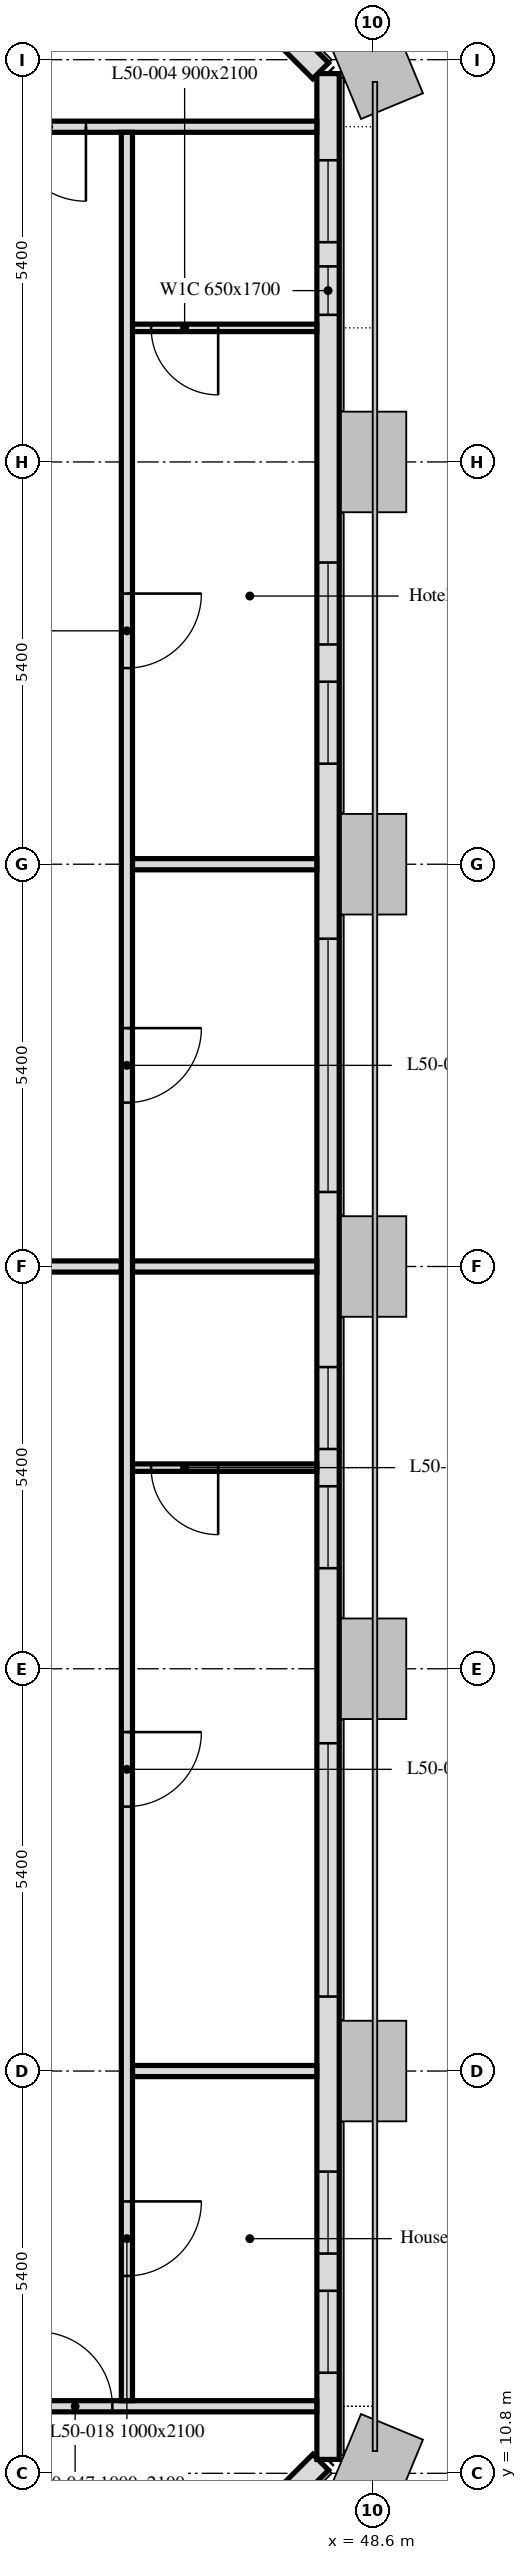
"""IFC4 building model, lengths in metres.
Left out: names, types, materials, properties, quantities, classifications, styles, units other than length and angle.
Written with IfcOpenShell. Run it as: python <this file> out.ifc"""

import sys

from ifc_helpers import new_model, si_unit, direction, frame, frame_2d, origin, place, context, subcontext, project, spatial, rectangle, extrude, element, fill, save


model = new_model("IFC4")
c1 = context("Model", 3, precision=1e-05, world=origin(), true_north=direction((0.0, 1.0)))
c2 = subcontext(c1, "Body", "Model", "MODEL_VIEW")
j1 = project(units=[si_unit("LENGTHUNIT", "METRE"), si_unit("PLANEANGLEUNIT", "RADIAN")], contexts=[c1])
p1 = place(None, origin())
s1 = spatial("IfcSite", under=j1, at=p1, CompositionType="ELEMENT")
p2 = place(p1, origin())
s2 = spatial("IfcBuilding", under=s1, at=p2, CompositionType="ELEMENT")
p3 = place(p2, frame((0.0, 0.0, 203.8)))
s3 = spatial("IfcBuildingStorey", under=s2, at=p3, CompositionType="ELEMENT", Elevation=203.8)
p4 = place(p3, frame((43.051, 6.099, 0.0), z_axis=(0.0, 0.0, 1.0), x_axis=(0.707106781187, 0.707106781187, 0.0)))
e1 = element("IfcWall", 1, at=p4, inside=s3, PredefinedType="SOLIDWALL", context=c2, shape_type="SweptSolid", body=[
    extrude(rectangle(XDim=6.86, YDim=0.3, at=frame_2d((3.43, 0.0))), origin(), (0.0, 0.0, 1.0), 3.0),
])
p5 = place(p4, frame((1.28, 0.0, 0.9)))
e2 = element("IfcOpeningElement", 2, at=p5, cuts=e1, PredefinedType="OPENING", context=c2, shape_type="SweptSolid", body=[
    extrude(rectangle(XDim=1.1, YDim=1.7, at=frame_2d((0.55, 0.85))), frame((0.0, 0.16, 0.0), z_axis=(0.0, -1.0, 0.0), x_axis=(1.0, 0.0, 0.0)), (0.0, 0.0, 1.0), 0.32),
])
p6 = place(p4, frame((4.48, 0.0, 0.9)))
e3 = element("IfcOpeningElement", 3, at=p6, cuts=e1, PredefinedType="OPENING", context=c2, shape_type="SweptSolid", body=[
    extrude(rectangle(XDim=1.1, YDim=1.7, at=frame_2d((0.55, 0.85))), frame((0.0, 0.16, 0.0), z_axis=(0.0, -1.0, 0.0), x_axis=(1.0, 0.0, 0.0)), (0.0, 0.0, 1.0), 0.32),
])
p7 = place(p3, frame((48.0, 10.986, 0.0), z_axis=(0.0, 0.0, 1.0), x_axis=(0.0, 1.0, 0.0)))
e4 = element("IfcWall", 4, at=p7, inside=s3, PredefinedType="SOLIDWALL", context=c2, shape_type="SweptSolid", body=[
    extrude(rectangle(XDim=32.027, YDim=0.3, at=frame_2d((16.014, 0.0))), origin(), (0.0, 0.0, 1.0), 3.0),
])
p8 = place(p7, frame((1.164, 0.0, 0.9)))
e5 = element("IfcOpeningElement", 5, at=p8, cuts=e4, PredefinedType="OPENING", context=c2, shape_type="SweptSolid", body=[
    extrude(rectangle(XDim=1.1, YDim=1.7, at=frame_2d((0.55, 0.85))), frame((0.0, 0.16, 0.0), z_axis=(0.0, -1.0, 0.0), x_axis=(1.0, 0.0, 0.0)), (0.0, 0.0, 1.0), 0.32),
])
p9 = place(p7, frame((2.764, 0.0, 0.9)))
e6 = element("IfcOpeningElement", 6, at=p9, cuts=e4, PredefinedType="OPENING", context=c2, shape_type="SweptSolid", body=[
    extrude(rectangle(XDim=1.1, YDim=1.7, at=frame_2d((0.55, 0.85))), frame((0.0, 0.16, 0.0), z_axis=(0.0, -1.0, 0.0), x_axis=(1.0, 0.0, 0.0)), (0.0, 0.0, 1.0), 0.32),
])
p10 = place(p7, frame((6.214, 0.0, 0.9)))
e7 = element("IfcOpeningElement", 7, at=p10, cuts=e4, PredefinedType="OPENING", context=c2, shape_type="SweptSolid", body=[
    extrude(rectangle(XDim=3.4, YDim=1.7, at=frame_2d((1.7, 0.85))), frame((0.0, 0.16, 0.0), z_axis=(0.0, -1.0, 0.0), x_axis=(1.0, 0.0, 0.0)), (0.0, 0.0, 1.0), 0.32),
])
p11 = place(p7, frame((11.964, 0.0, 0.9)))
e8 = element("IfcOpeningElement", 8, at=p11, cuts=e4, PredefinedType="OPENING", context=c2, shape_type="SweptSolid", body=[
    extrude(rectangle(XDim=1.1, YDim=1.7, at=frame_2d((0.55, 0.85))), frame((0.0, 0.16, 0.0), z_axis=(0.0, -1.0, 0.0), x_axis=(1.0, 0.0, 0.0)), (0.0, 0.0, 1.0), 0.32),
])
p12 = place(p7, frame((13.564, 0.0, 0.9)))
e9 = element("IfcOpeningElement", 9, at=p12, cuts=e4, PredefinedType="OPENING", context=c2, shape_type="SweptSolid", body=[
    extrude(rectangle(XDim=1.1, YDim=1.7, at=frame_2d((0.55, 0.85))), frame((0.0, 0.16, 0.0), z_axis=(0.0, -1.0, 0.0), x_axis=(1.0, 0.0, 0.0)), (0.0, 0.0, 1.0), 0.32),
])
p13 = place(p7, frame((17.014, 0.0, 0.9)))
e10 = element("IfcOpeningElement", 10, at=p13, cuts=e4, PredefinedType="OPENING", context=c2, shape_type="SweptSolid", body=[
    extrude(rectangle(XDim=3.4, YDim=1.7, at=frame_2d((1.7, 0.85))), frame((0.0, 0.16, 0.0), z_axis=(0.0, -1.0, 0.0), x_axis=(1.0, 0.0, 0.0)), (0.0, 0.0, 1.0), 0.32),
])
p14 = place(p7, frame((22.764, 0.0, 0.9)))
e11 = element("IfcOpeningElement", 11, at=p14, cuts=e4, PredefinedType="OPENING", context=c2, shape_type="SweptSolid", body=[
    extrude(rectangle(XDim=1.1, YDim=1.7, at=frame_2d((0.55, 0.85))), frame((0.0, 0.16, 0.0), z_axis=(0.0, -1.0, 0.0), x_axis=(1.0, 0.0, 0.0)), (0.0, 0.0, 1.0), 0.32),
])
p15 = place(p7, frame((24.364, 0.0, 0.9)))
e12 = element("IfcOpeningElement", 12, at=p15, cuts=e4, PredefinedType="OPENING", context=c2, shape_type="SweptSolid", body=[
    extrude(rectangle(XDim=1.1, YDim=1.7, at=frame_2d((0.55, 0.85))), frame((0.0, 0.16, 0.0), z_axis=(0.0, -1.0, 0.0), x_axis=(1.0, 0.0, 0.0)), (0.0, 0.0, 1.0), 0.32),
])
p16 = place(p7, frame((28.789, 0.0, 0.9)))
e13 = element("IfcOpeningElement", 13, at=p16, cuts=e4, PredefinedType="OPENING", context=c2, shape_type="SweptSolid", body=[
    extrude(rectangle(XDim=0.65, YDim=1.7, at=frame_2d((0.325, 0.85))), frame((0.0, 0.16, 0.0), z_axis=(0.0, -1.0, 0.0), x_axis=(1.0, 0.0, 0.0)), (0.0, 0.0, 1.0), 0.32),
])
p17 = place(p7, frame((29.764, 0.0, 0.9)))
e14 = element("IfcOpeningElement", 14, at=p17, cuts=e4, PredefinedType="OPENING", context=c2, shape_type="SweptSolid", body=[
    extrude(rectangle(XDim=1.1, YDim=1.7, at=frame_2d((0.55, 0.85))), frame((0.0, 0.16, 0.0), z_axis=(0.0, -1.0, 0.0), x_axis=(1.0, 0.0, 0.0)), (0.0, 0.0, 1.0), 0.32),
])
p18 = place(p3, frame((47.901, 43.051, 0.0), z_axis=(0.0, 0.0, 1.0), x_axis=(-0.707106781187, 0.707106781187, 0.0)))
e15 = element("IfcWall", 15, at=p18, inside=s3, PredefinedType="SOLIDWALL", context=c2, shape_type="SweptSolid", body=[
    extrude(rectangle(XDim=6.86, YDim=0.3, at=frame_2d((3.43, 0.0))), origin(), (0.0, 0.0, 1.0), 3.0),
])
p19 = place(p18, frame((1.28, 0.0, 0.9)))
e16 = element("IfcOpeningElement", 16, at=p19, cuts=e15, PredefinedType="OPENING", context=c2, shape_type="SweptSolid", body=[
    extrude(rectangle(XDim=1.1, YDim=1.7, at=frame_2d((0.55, 0.85))), frame((0.0, 0.16, 0.0), z_axis=(0.0, -1.0, 0.0), x_axis=(1.0, 0.0, 0.0)), (0.0, 0.0, 1.0), 0.32),
])
p20 = place(p18, frame((4.48, 0.0, 0.9)))
e17 = element("IfcOpeningElement", 17, at=p20, cuts=e15, PredefinedType="OPENING", context=c2, shape_type="SweptSolid", body=[
    extrude(rectangle(XDim=1.1, YDim=1.7, at=frame_2d((0.55, 0.85))), frame((0.0, 0.16, 0.0), z_axis=(0.0, -1.0, 0.0), x_axis=(1.0, 0.0, 0.0)), (0.0, 0.0, 1.0), 0.32),
])
p21 = place(p3, frame((45.375, 32.4, 0.0), z_axis=(0.0, 0.0, 1.0), x_axis=(1.0, 0.0, 0.0)))
e18 = element("IfcWall", 18, at=p21, inside=s3, PredefinedType="PARTITIONING", context=c2, shape_type="SweptSolid", body=[
    extrude(rectangle(XDim=2.474, YDim=0.15, at=frame_2d((1.237, 0.0))), origin(), (0.0, 0.0, 1.0), 2.4),
])
p22 = place(p3, frame((47.849, 39.6, 0.0), z_axis=(0.0, 0.0, 1.0), x_axis=(-1.0, 0.0, 0.0)))
e19 = element("IfcWall", 19, at=p22, inside=s3, PredefinedType="PARTITIONING", context=c2, shape_type="SweptSolid", body=[
    extrude(rectangle(XDim=2.474, YDim=0.1, at=frame_2d((1.237, 0.0))), origin(), (0.0, 0.0, 1.0), 3.0),
])
p23 = place(p22, frame((1.324, 0.0, 0.0)))
e20 = element("IfcOpeningElement", 20, at=p23, cuts=e19, PredefinedType="OPENING", context=c2, shape_type="SweptSolid", body=[
    extrude(rectangle(XDim=0.9, YDim=2.1, at=frame_2d((0.45, 1.05))), frame((0.0, 0.05, 0.0), z_axis=(0.0, -1.0, 0.0), x_axis=(1.0, 0.0, 0.0)), (0.0, 0.0, 1.0), 0.1),
])
p24 = place(p3, frame((47.849, 42.3, 0.0), z_axis=(0.0, 0.0, 1.0), x_axis=(-1.0, 0.0, 0.0)))
e21 = element("IfcWall", 21, at=p24, inside=s3, PredefinedType="PARTITIONING", context=c2, shape_type="SweptSolid", body=[
    extrude(rectangle(XDim=41.698, YDim=0.15, at=frame_2d((20.849, 0.0))), origin(), (0.0, 0.0, 1.0), 2.4),
])
p25 = place(p24, frame((39.566, 0.0, 0.0)))
e22 = element("IfcOpeningElement", 22, at=p25, cuts=e21, PredefinedType="OPENING", context=c2, shape_type="SweptSolid", body=[
    extrude(rectangle(XDim=1.0, YDim=2.1, at=frame_2d((0.5, 1.05))), frame((0.0, 0.075, 0.0), z_axis=(0.0, -1.0, 0.0), x_axis=(1.0, 0.0, 0.0)), (0.0, 0.0, 1.0), 0.15),
])
p26 = place(p24, frame((3.099, 0.0, 0.0)))
e23 = element("IfcOpeningElement", 23, at=p26, cuts=e21, PredefinedType="OPENING", context=c2, shape_type="SweptSolid", body=[
    extrude(rectangle(XDim=1.0, YDim=2.1, at=frame_2d((0.5, 1.05))), frame((0.0, 0.075, 0.0), z_axis=(0.0, -1.0, 0.0), x_axis=(1.0, 0.0, 0.0)), (0.0, 0.0, 1.0), 0.15),
])
p27 = place(p24, frame((28.249, 0.0, 0.0)))
e24 = element("IfcOpeningElement", 24, at=p27, cuts=e21, PredefinedType="OPENING", context=c2, shape_type="SweptSolid", body=[
    extrude(rectangle(XDim=1.0, YDim=2.1, at=frame_2d((0.5, 1.05))), frame((0.0, 0.075, 0.0), z_axis=(0.0, -1.0, 0.0), x_axis=(1.0, 0.0, 0.0)), (0.0, 0.0, 1.0), 0.15),
])
p28 = place(p24, frame((17.449, 0.0, 0.0)))
e25 = element("IfcOpeningElement", 25, at=p28, cuts=e21, PredefinedType="OPENING", context=c2, shape_type="SweptSolid", body=[
    extrude(rectangle(XDim=1.0, YDim=2.1, at=frame_2d((0.5, 1.05))), frame((0.0, 0.075, 0.0), z_axis=(0.0, -1.0, 0.0), x_axis=(1.0, 0.0, 0.0)), (0.0, 0.0, 1.0), 0.15),
])
p29 = place(p3, frame((45.375, 27.0, 0.0), z_axis=(0.0, 0.0, 1.0), x_axis=(1.0, 0.0, 0.0)))
e26 = element("IfcWall", 26, at=p29, inside=s3, PredefinedType="PARTITIONING", context=c2, shape_type="SweptSolid", body=[
    extrude(rectangle(XDim=2.474, YDim=0.15, at=frame_2d((1.237, 0.0))), origin(), (0.0, 0.0, 1.0), 2.4),
])
p30 = place(p3, frame((43.2, 27.0, 0.0), z_axis=(0.0, 0.0, 1.0), x_axis=(1.0, 0.0, 0.0)))
e27 = element("IfcWall", 27, at=p30, inside=s3, PredefinedType="PARTITIONING", context=c2, shape_type="SweptSolid", body=[
    extrude(rectangle(XDim=2.025, YDim=0.15, at=frame_2d((1.013, 0.0))), origin(), (0.0, 0.0, 1.0), 2.4),
])
p31 = place(p3, frame((47.849, 16.2, 0.0), z_axis=(0.0, 0.0, 1.0), x_axis=(-1.0, 0.0, 0.0)))
e28 = element("IfcWall", 28, at=p31, inside=s3, PredefinedType="PARTITIONING", context=c2, shape_type="SweptSolid", body=[
    extrude(rectangle(XDim=2.474, YDim=0.15, at=frame_2d((1.237, 0.0))), origin(), (0.0, 0.0, 1.0), 2.4),
])
p32 = place(p3, frame((6.151, 11.7, 0.0), z_axis=(0.0, 0.0, 1.0), x_axis=(1.0, 0.0, 0.0)))
e29 = element("IfcWall", 29, at=p32, inside=s3, PredefinedType="PARTITIONING", context=c2, shape_type="SweptSolid", body=[
    extrude(rectangle(XDim=41.698, YDim=0.15, at=frame_2d((20.849, 0.0))), origin(), (0.0, 0.0, 1.0), 3.0),
])
p33 = place(p32, frame((37.954, 0.0, 0.0)))
e30 = element("IfcOpeningElement", 30, at=p33, cuts=e29, PredefinedType="OPENING", context=c2, shape_type="SweptSolid", body=[
    extrude(rectangle(XDim=1.0, YDim=2.1, at=frame_2d((0.5, 1.05))), frame((0.0, 0.075, 0.0), z_axis=(0.0, -1.0, 0.0), x_axis=(1.0, 0.0, 0.0)), (0.0, 0.0, 1.0), 0.15),
])
p34 = place(p32, frame((6.849, 0.0, 0.0)))
e31 = element("IfcOpeningElement", 31, at=p34, cuts=e29, PredefinedType="OPENING", context=c2, shape_type="SweptSolid", body=[
    extrude(rectangle(XDim=1.0, YDim=2.1, at=frame_2d((0.5, 1.05))), frame((0.0, 0.075, 0.0), z_axis=(0.0, -1.0, 0.0), x_axis=(1.0, 0.0, 0.0)), (0.0, 0.0, 1.0), 0.15),
])
p35 = place(p32, frame((23.049, 0.0, 0.0)))
e32 = element("IfcOpeningElement", 32, at=p35, cuts=e29, PredefinedType="OPENING", context=c2, shape_type="SweptSolid", body=[
    extrude(rectangle(XDim=1.0, YDim=2.1, at=frame_2d((0.5, 1.05))), frame((0.0, 0.075, 0.0), z_axis=(0.0, -1.0, 0.0), x_axis=(1.0, 0.0, 0.0)), (0.0, 0.0, 1.0), 0.15),
])
p36 = place(p3, frame((47.849, 24.3, 0.0), z_axis=(0.0, 0.0, 1.0), x_axis=(-1.0, 0.0, 0.0)))
e33 = element("IfcWall", 33, at=p36, inside=s3, PredefinedType="PARTITIONING", context=c2, shape_type="SweptSolid", body=[
    extrude(rectangle(XDim=2.474, YDim=0.1, at=frame_2d((1.237, 0.0))), origin(), (0.0, 0.0, 1.0), 3.0),
])
p37 = place(p36, frame((1.324, 0.0, 0.0)))
e34 = element("IfcOpeningElement", 34, at=p37, cuts=e33, PredefinedType="OPENING", context=c2, shape_type="SweptSolid", body=[
    extrude(rectangle(XDim=0.9, YDim=2.1, at=frame_2d((0.45, 1.05))), frame((0.0, 0.05, 0.0), z_axis=(0.0, -1.0, 0.0), x_axis=(1.0, 0.0, 0.0)), (0.0, 0.0, 1.0), 0.1),
])
p38 = place(p3, frame((45.3, 42.225, 0.0), z_axis=(0.0, 0.0, 1.0), x_axis=(0.0, -1.0, 0.0)))
e35 = element("IfcWall", 35, at=p38, inside=s3, PredefinedType="PARTITIONING", context=c2, shape_type="SweptSolid", body=[
    extrude(rectangle(XDim=30.45, YDim=0.15, at=frame_2d((15.225, 0.0))), origin(), (0.0, 0.0, 1.0), 2.4),
])
p39 = place(p38, frame((12.025, 0.0, 0.0)))
e36 = element("IfcOpeningElement", 36, at=p39, cuts=e35, PredefinedType="OPENING", context=c2, shape_type="SweptSolid", body=[
    extrude(rectangle(XDim=1.0, YDim=2.1, at=frame_2d((0.5, 1.05))), frame((0.0, 0.075, 0.0), z_axis=(0.0, -1.0, 0.0), x_axis=(1.0, 0.0, 0.0)), (0.0, 0.0, 1.0), 0.15),
])
p40 = place(p38, frame((27.775, 0.0, 0.0)))
e37 = element("IfcOpeningElement", 37, at=p40, cuts=e35, PredefinedType="OPENING", context=c2, shape_type="SweptSolid", body=[
    extrude(rectangle(XDim=1.0, YDim=2.1, at=frame_2d((0.5, 1.05))), frame((0.0, 0.075, 0.0), z_axis=(0.0, -1.0, 0.0), x_axis=(1.0, 0.0, 0.0)), (0.0, 0.0, 1.0), 0.15),
])
p41 = place(p38, frame((6.192, 0.0, 0.0)))
e38 = element("IfcOpeningElement", 38, at=p41, cuts=e35, PredefinedType="OPENING", context=c2, shape_type="SweptSolid", body=[
    extrude(rectangle(XDim=1.0, YDim=2.1, at=frame_2d((0.5, 1.05))), frame((0.0, 0.075, 0.0), z_axis=(0.0, -1.0, 0.0), x_axis=(1.0, 0.0, 0.0)), (0.0, 0.0, 1.0), 0.15),
])
p42 = place(p38, frame((21.475, 0.0, 0.0)))
e39 = element("IfcOpeningElement", 39, at=p42, cuts=e35, PredefinedType="OPENING", context=c2, shape_type="SweptSolid", body=[
    extrude(rectangle(XDim=1.0, YDim=2.1, at=frame_2d((0.5, 1.05))), frame((0.0, 0.075, 0.0), z_axis=(0.0, -1.0, 0.0), x_axis=(1.0, 0.0, 0.0)), (0.0, 0.0, 1.0), 0.15),
])
p43 = place(p8, origin())
e40 = element("IfcWindow", 40, at=p43, inside=s3, PartitioningType="SINGLE_PANEL", PredefinedType="WINDOW", context=c2, shape_type="SweptSolid", body=[
    extrude(rectangle(XDim=1.1, YDim=1.7, at=frame_2d((0.55, 0.85))), frame((0.0, 0.03, 0.0), z_axis=(0.0, -1.0, 0.0), x_axis=(1.0, 0.0, 0.0)), (0.0, 0.0, 1.0), 0.06),
])
fill(e5, e40)
p44 = place(p9, origin())
e41 = element("IfcWindow", 41, at=p44, inside=s3, PartitioningType="SINGLE_PANEL", PredefinedType="WINDOW", context=c2, shape_type="SweptSolid", body=[
    extrude(rectangle(XDim=1.1, YDim=1.7, at=frame_2d((0.55, 0.85))), frame((0.0, 0.03, 0.0), z_axis=(0.0, -1.0, 0.0), x_axis=(1.0, 0.0, 0.0)), (0.0, 0.0, 1.0), 0.06),
])
fill(e6, e41)
p45 = place(p10, origin())
e42 = element("IfcWindow", 42, at=p45, inside=s3, PartitioningType="SINGLE_PANEL", PredefinedType="WINDOW", context=c2, shape_type="SweptSolid", body=[
    extrude(rectangle(XDim=3.4, YDim=1.7, at=frame_2d((1.7, 0.85))), frame((0.0, 0.03, 0.0), z_axis=(0.0, -1.0, 0.0), x_axis=(1.0, 0.0, 0.0)), (0.0, 0.0, 1.0), 0.06),
])
fill(e7, e42)
p46 = place(p11, origin())
e43 = element("IfcWindow", 43, at=p46, inside=s3, PartitioningType="SINGLE_PANEL", PredefinedType="WINDOW", context=c2, shape_type="SweptSolid", body=[
    extrude(rectangle(XDim=1.1, YDim=1.7, at=frame_2d((0.55, 0.85))), frame((0.0, 0.03, 0.0), z_axis=(0.0, -1.0, 0.0), x_axis=(1.0, 0.0, 0.0)), (0.0, 0.0, 1.0), 0.06),
])
fill(e8, e43)
p47 = place(p12, origin())
e44 = element("IfcWindow", 44, at=p47, inside=s3, PartitioningType="SINGLE_PANEL", PredefinedType="WINDOW", context=c2, shape_type="SweptSolid", body=[
    extrude(rectangle(XDim=1.1, YDim=1.7, at=frame_2d((0.55, 0.85))), frame((0.0, 0.03, 0.0), z_axis=(0.0, -1.0, 0.0), x_axis=(1.0, 0.0, 0.0)), (0.0, 0.0, 1.0), 0.06),
])
fill(e9, e44)
p48 = place(p13, origin())
e45 = element("IfcWindow", 45, at=p48, inside=s3, PartitioningType="SINGLE_PANEL", PredefinedType="WINDOW", context=c2, shape_type="SweptSolid", body=[
    extrude(rectangle(XDim=3.4, YDim=1.7, at=frame_2d((1.7, 0.85))), frame((0.0, 0.03, 0.0), z_axis=(0.0, -1.0, 0.0), x_axis=(1.0, 0.0, 0.0)), (0.0, 0.0, 1.0), 0.06),
])
fill(e10, e45)
p49 = place(p14, origin())
e46 = element("IfcWindow", 46, at=p49, inside=s3, PartitioningType="SINGLE_PANEL", PredefinedType="WINDOW", context=c2, shape_type="SweptSolid", body=[
    extrude(rectangle(XDim=1.1, YDim=1.7, at=frame_2d((0.55, 0.85))), frame((0.0, 0.03, 0.0), z_axis=(0.0, -1.0, 0.0), x_axis=(1.0, 0.0, 0.0)), (0.0, 0.0, 1.0), 0.06),
])
fill(e11, e46)
p50 = place(p15, origin())
e47 = element("IfcWindow", 47, at=p50, inside=s3, PartitioningType="SINGLE_PANEL", PredefinedType="WINDOW", context=c2, shape_type="SweptSolid", body=[
    extrude(rectangle(XDim=1.1, YDim=1.7, at=frame_2d((0.55, 0.85))), frame((0.0, 0.03, 0.0), z_axis=(0.0, -1.0, 0.0), x_axis=(1.0, 0.0, 0.0)), (0.0, 0.0, 1.0), 0.06),
])
fill(e12, e47)
p51 = place(p16, origin())
e48 = element("IfcWindow", 48, at=p51, inside=s3, PartitioningType="SINGLE_PANEL", PredefinedType="WINDOW", context=c2, shape_type="SweptSolid", body=[
    extrude(rectangle(XDim=0.65, YDim=1.7, at=frame_2d((0.325, 0.85))), frame((0.0, 0.03, 0.0), z_axis=(0.0, -1.0, 0.0), x_axis=(1.0, 0.0, 0.0)), (0.0, 0.0, 1.0), 0.06),
])
fill(e13, e48)
p52 = place(p17, origin())
e49 = element("IfcWindow", 49, at=p52, inside=s3, PartitioningType="SINGLE_PANEL", PredefinedType="WINDOW", context=c2, shape_type="SweptSolid", body=[
    extrude(rectangle(XDim=1.1, YDim=1.7, at=frame_2d((0.55, 0.85))), frame((0.0, 0.03, 0.0), z_axis=(0.0, -1.0, 0.0), x_axis=(1.0, 0.0, 0.0)), (0.0, 0.0, 1.0), 0.06),
])
fill(e14, e49)
p53 = place(p23, origin())
e50 = element("IfcDoor", 50, at=p53, inside=s3, OperationType="SINGLE_SWING_RIGHT", PredefinedType="DOOR", context=c2, shape_type="SweptSolid", body=[
    extrude(rectangle(XDim=0.9, YDim=2.1, at=frame_2d((0.45, 1.05))), frame((0.0, 0.025, 0.0), z_axis=(0.0, -1.0, 0.0), x_axis=(1.0, 0.0, 0.0)), (0.0, 0.0, 1.0), 0.05),
])
fill(e20, e50)
p54 = place(p39, origin())
e51 = element("IfcDoor", 51, at=p54, inside=s3, OperationType="SINGLE_SWING_RIGHT", PredefinedType="DOOR", context=c2, shape_type="SweptSolid", body=[
    extrude(rectangle(XDim=1.0, YDim=2.1, at=frame_2d((0.5, 1.05))), frame((0.0, 0.025, 0.0), z_axis=(0.0, -1.0, 0.0), x_axis=(1.0, 0.0, 0.0)), (0.0, 0.0, 1.0), 0.05),
])
fill(e36, e51)
p55 = place(p40, origin())
e52 = element("IfcDoor", 52, at=p55, inside=s3, OperationType="SINGLE_SWING_LEFT", PredefinedType="DOOR", context=c2, shape_type="SweptSolid", body=[
    extrude(rectangle(XDim=1.0, YDim=2.1, at=frame_2d((0.5, 1.05))), frame((0.0, 0.025, 0.0), z_axis=(0.0, -1.0, 0.0), x_axis=(1.0, 0.0, 0.0)), (0.0, 0.0, 1.0), 0.05),
])
fill(e37, e52)
p56 = place(p37, origin())
e53 = element("IfcDoor", 53, at=p56, inside=s3, OperationType="SINGLE_SWING_LEFT", PredefinedType="DOOR", context=c2, shape_type="SweptSolid", body=[
    extrude(rectangle(XDim=0.9, YDim=2.1, at=frame_2d((0.45, 1.05))), frame((0.0, 0.025, 0.0), z_axis=(0.0, -1.0, 0.0), x_axis=(1.0, 0.0, 0.0)), (0.0, 0.0, 1.0), 0.05),
])
fill(e34, e53)
p57 = place(p41, origin())
e54 = element("IfcDoor", 54, at=p57, inside=s3, OperationType="SINGLE_SWING_RIGHT", PredefinedType="DOOR", context=c2, shape_type="SweptSolid", body=[
    extrude(rectangle(XDim=1.0, YDim=2.1, at=frame_2d((0.5, 1.05))), frame((0.0, 0.025, 0.0), z_axis=(0.0, -1.0, 0.0), x_axis=(1.0, 0.0, 0.0)), (0.0, 0.0, 1.0), 0.05),
])
fill(e38, e54)
p58 = place(p26, origin())
e55 = element("IfcDoor", 55, at=p58, inside=s3, OperationType="SINGLE_SWING_RIGHT", PredefinedType="DOOR", context=c2, shape_type="SweptSolid", body=[
    extrude(rectangle(XDim=1.0, YDim=2.1, at=frame_2d((0.5, 1.05))), frame((0.0, 0.025, 0.0), z_axis=(0.0, -1.0, 0.0), x_axis=(1.0, 0.0, 0.0)), (0.0, 0.0, 1.0), 0.05),
])
fill(e23, e55)
p59 = place(p33, origin())
e56 = element("IfcDoor", 56, at=p59, inside=s3, OperationType="SINGLE_SWING_LEFT", PredefinedType="DOOR", context=c2, shape_type="SweptSolid", body=[
    extrude(rectangle(XDim=1.0, YDim=2.1, at=frame_2d((0.5, 1.05))), frame((0.0, 0.025, 0.0), z_axis=(0.0, -1.0, 0.0), x_axis=(1.0, 0.0, 0.0)), (0.0, 0.0, 1.0), 0.05),
])
fill(e30, e56)
p60 = place(p42, origin())
e57 = element("IfcDoor", 57, at=p60, inside=s3, OperationType="SINGLE_SWING_RIGHT", PredefinedType="DOOR", context=c2, shape_type="SweptSolid", body=[
    extrude(rectangle(XDim=1.0, YDim=2.1, at=frame_2d((0.5, 1.05))), frame((0.0, 0.025, 0.0), z_axis=(0.0, -1.0, 0.0), x_axis=(1.0, 0.0, 0.0)), (0.0, 0.0, 1.0), 0.05),
])
fill(e39, e57)
save(model, sys.argv[1])
